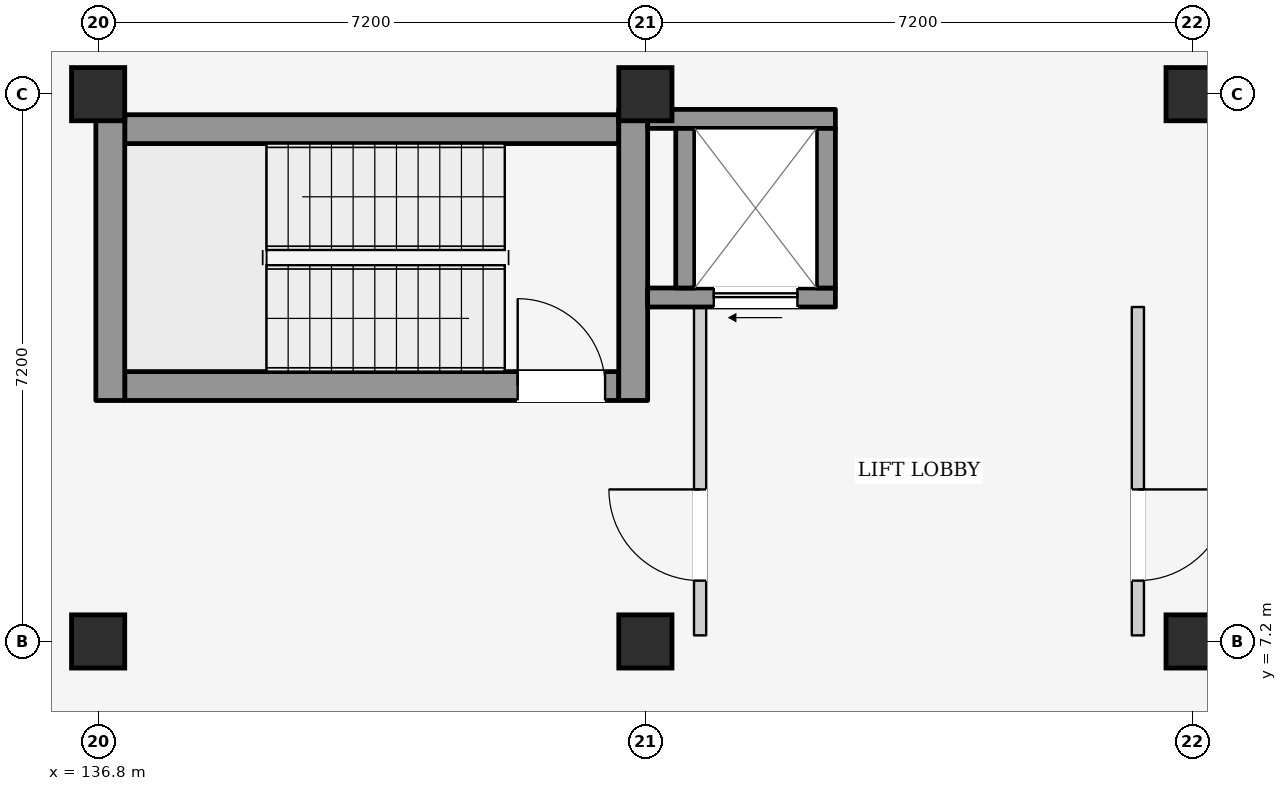
"""IFC4 building model, lengths in metres.
Left out: names, types, materials, properties, quantities, classifications, styles, units other than length and angle.
Written with IfcOpenShell. Run it as: python <this file> out.ifc"""

import sys

from ifc_helpers import new_model, si_unit, direction, frame, frame_2d, origin, origin_2d, place, context, subcontext, project, spatial, rectangle, extrude, element, fill, save


model = new_model("IFC4")
c1 = context("Model", 3, precision=1e-05, world=origin(), true_north=direction((0.0, 1.0)))
c2 = subcontext(c1, "Body", "Model", "MODEL_VIEW")
j1 = project(units=[si_unit("LENGTHUNIT", "METRE"), si_unit("PLANEANGLEUNIT", "RADIAN")], contexts=[c1])
p1 = place(None, origin())
s1 = spatial("IfcSite", under=j1, at=p1, CompositionType="ELEMENT")
p2 = place(p1, origin())
s2 = spatial("IfcBuilding", under=s1, at=p2, CompositionType="ELEMENT")
p3 = place(p2, frame((0.0, 0.0, -4.2)))
s3 = spatial("IfcBuildingStorey", under=s2, at=p3, CompositionType="ELEMENT", Elevation=-4.2)
for number, where, z_axis, x_axis in (
    (1, (136.8, 7.2, 0.0), (0.0, 0.0, 1.0), (1.0, 0.0, 0.0)),
    (2, (136.8, 14.4, 0.0), (0.0, 0.0, 1.0), (1.0, 0.0, 0.0)),
    (3, (144.0, 7.2, 0.0), (0.0, 0.0, 1.0), (1.0, 0.0, 0.0)),
    (4, (144.0, 14.4, 0.0), (0.0, 0.0, 1.0), (1.0, 0.0, 0.0)),
    (5, (151.2, 7.2, 0.0), (0.0, 0.0, 1.0), (1.0, 0.0, 0.0)),
    (6, (151.2, 14.4, 0.0), (0.0, 0.0, 1.0), (1.0, 0.0, 0.0)),
):
    element("IfcColumn", number, at=place(p3, frame(where, z_axis=z_axis, x_axis=x_axis)), inside=s3, PredefinedType="COLUMN", context=c2, shape_type="SweptSolid", body=[
        extrude(rectangle(XDim=0.7, YDim=0.7, at=origin_2d()), origin(), (0.0, 0.0, 1.0), 4.2),
    ])
p4 = place(p3, frame((137.15, 10.56, 0.0), z_axis=(0.0, 0.0, 1.0), x_axis=(1.0, 0.0, 0.0)))
e7 = element("IfcWall", 7, at=p4, inside=s3, PredefinedType="SHEAR", context=c2, shape_type="SweptSolid", body=[
    extrude(rectangle(XDim=6.5, YDim=0.38, at=frame_2d((3.25, 0.0))), origin(), (0.0, 0.0, 1.0), 3.79),
])
p5 = place(p4, frame((5.17, 0.0, 0.0)))
e8 = element("IfcOpeningElement", 8, at=p5, cuts=e7, PredefinedType="OPENING", context=c2, shape_type="SweptSolid", body=[
    extrude(rectangle(XDim=1.15, YDim=2.2, at=frame_2d((0.575, 1.1))), frame((0.0, 0.205, 0.0), z_axis=(0.0, -1.0, 0.0), x_axis=(1.0, 0.0, 0.0)), (0.0, 0.0, 1.0), 0.41),
])
p6 = place(p3, frame((137.15, 13.94, 0.0), z_axis=(0.0, 0.0, 1.0), x_axis=(1.0, 0.0, 0.0)))
e9 = element("IfcWall", 9, at=p6, inside=s3, PredefinedType="SHEAR", context=c2, shape_type="SweptSolid", body=[
    extrude(rectangle(XDim=6.5, YDim=0.38, at=frame_2d((3.25, 0.0))), origin(), (0.0, 0.0, 1.0), 3.79),
])
p7 = place(p3, frame((136.96, 10.37, 0.0), z_axis=(0.0, 0.0, 1.0), x_axis=(0.0, 1.0, 0.0)))
e10 = element("IfcWall", 10, at=p7, inside=s3, PredefinedType="SHEAR", context=c2, shape_type="SweptSolid", body=[
    extrude(rectangle(XDim=3.76, YDim=0.38, at=frame_2d((1.88, 0.0))), origin(), (0.0, 0.0, 1.0), 3.79),
])
p8 = place(p3, frame((143.84, 10.37, 0.0), z_axis=(0.0, 0.0, 1.0), x_axis=(0.0, 1.0, 0.0)))
e11 = element("IfcWall", 11, at=p8, inside=s3, PredefinedType="SHEAR", context=c2, shape_type="SweptSolid", body=[
    extrude(rectangle(XDim=3.83, YDim=0.38, at=frame_2d((1.915, 0.0))), origin(), (0.0, 0.0, 1.0), 3.79),
])
p9 = place(p3, frame((144.72, 7.28, 0.0), z_axis=(0.0, 0.0, 1.0), x_axis=(0.0, 1.0, 0.0)))
e12 = element("IfcWall", 12, at=p9, inside=s3, PredefinedType="PARTITIONING", context=c2, shape_type="SweptSolid", body=[
    extrude(rectangle(XDim=4.32, YDim=0.16, at=frame_2d((2.16, 0.0))), origin(), (0.0, 0.0, 1.0), 3.79),
])
p10 = place(p9, frame((0.72, 0.0, 0.0)))
e13 = element("IfcOpeningElement", 13, at=p10, cuts=e12, PredefinedType="OPENING", context=c2, shape_type="SweptSolid", body=[
    extrude(rectangle(XDim=1.2, YDim=2.2, at=frame_2d((0.6, 1.1))), frame((0.0, 0.095, 0.0), z_axis=(0.0, -1.0, 0.0), x_axis=(1.0, 0.0, 0.0)), (0.0, 0.0, 1.0), 0.19),
])
p11 = place(p3, frame((150.48, 7.28, 0.0), z_axis=(0.0, 0.0, 1.0), x_axis=(0.0, 1.0, 0.0)))
e14 = element("IfcWall", 14, at=p11, inside=s3, PredefinedType="PARTITIONING", context=c2, shape_type="SweptSolid", body=[
    extrude(rectangle(XDim=4.32, YDim=0.16, at=frame_2d((2.16, 0.0))), origin(), (0.0, 0.0, 1.0), 3.79),
])
p12 = place(p11, frame((0.72, 0.0, 0.0)))
e15 = element("IfcOpeningElement", 15, at=p12, cuts=e14, PredefinedType="OPENING", context=c2, shape_type="SweptSolid", body=[
    extrude(rectangle(XDim=1.2, YDim=2.2, at=frame_2d((0.6, 1.1))), frame((0.0, 0.095, 0.0), z_axis=(0.0, -1.0, 0.0), x_axis=(1.0, 0.0, 0.0)), (0.0, 0.0, 1.0), 0.19),
])
p13 = place(p3, frame((144.03, 11.725, 0.0), z_axis=(0.0, 0.0, 1.0), x_axis=(1.0, 0.0, 0.0)))
e16 = element("IfcWall", 16, at=p13, inside=s3, PredefinedType="SHEAR", context=c2, shape_type="SweptSolid", body=[
    extrude(rectangle(XDim=2.47, YDim=0.25, at=frame_2d((1.235, 0.0))), origin(), (0.0, 0.0, 1.0), 3.79),
])
p14 = place(p13, frame((0.87, 0.0, 0.0)))
e17 = element("IfcOpeningElement", 17, at=p14, cuts=e16, PredefinedType="OPENING", context=c2, shape_type="SweptSolid", body=[
    extrude(rectangle(XDim=1.1, YDim=2.15, at=frame_2d((0.55, 1.075))), frame((0.0, 0.14, 0.0), z_axis=(0.0, -1.0, 0.0), x_axis=(1.0, 0.0, 0.0)), (0.0, 0.0, 1.0), 0.28),
])
p15 = place(p3, frame((144.03, 14.075, 0.0), z_axis=(0.0, 0.0, 1.0), x_axis=(1.0, 0.0, 0.0)))
e18 = element("IfcWall", 18, at=p15, inside=s3, PredefinedType="SHEAR", context=c2, shape_type="SweptSolid", body=[
    extrude(rectangle(XDim=2.47, YDim=0.25, at=frame_2d((1.235, 0.0))), origin(), (0.0, 0.0, 1.0), 3.79),
])
for number, where, z_axis, x_axis in (
    (19, (144.525, 11.85, 0.0), (0.0, 0.0, 1.0), (0.0, 1.0, 0.0)),
    (20, (146.375, 11.85, 0.0), (0.0, 0.0, 1.0), (0.0, 1.0, 0.0)),
):
    element("IfcWall", number, at=place(p3, frame(where, z_axis=z_axis, x_axis=x_axis)), inside=s3, PredefinedType="SHEAR", context=c2, shape_type="SweptSolid", body=[
        extrude(rectangle(XDim=2.1, YDim=0.25, at=frame_2d((1.05, 0.0))), origin(), (0.0, 0.0, 1.0), 3.79),
    ])
p16 = place(p5, origin())
e21 = element("IfcDoor", 21, at=p16, inside=s3, OperationType="SINGLE_SWING_LEFT", PredefinedType="DOOR", context=c2, shape_type="SweptSolid", body=[
    extrude(rectangle(XDim=1.15, YDim=2.2, at=frame_2d((0.575, 1.1))), frame((0.0, 0.025, 0.0), z_axis=(0.0, -1.0, 0.0), x_axis=(1.0, 0.0, 0.0)), (0.0, 0.0, 1.0), 0.05),
])
fill(e8, e21)
p17 = place(p10, origin())
e22 = element("IfcDoor", 22, at=p17, inside=s3, OperationType="SINGLE_SWING_RIGHT", PredefinedType="DOOR", context=c2, shape_type="SweptSolid", body=[
    extrude(rectangle(XDim=1.2, YDim=2.2, at=frame_2d((0.6, 1.1))), frame((0.0, 0.025, 0.0), z_axis=(0.0, -1.0, 0.0), x_axis=(1.0, 0.0, 0.0)), (0.0, 0.0, 1.0), 0.05),
])
fill(e13, e22)
p18 = place(p12, frame((1.2, 0.0, 0.0), z_axis=(0.0, 0.0, 1.0), x_axis=(-1.0, 0.0, 0.0)))
e23 = element("IfcDoor", 23, at=p18, inside=s3, OperationType="SINGLE_SWING_LEFT", PredefinedType="DOOR", context=c2, shape_type="SweptSolid", body=[
    extrude(rectangle(XDim=1.2, YDim=2.2, at=frame_2d((0.6, 1.1))), frame((0.0, 0.025, 0.0), z_axis=(0.0, -1.0, 0.0), x_axis=(1.0, 0.0, 0.0)), (0.0, 0.0, 1.0), 0.05),
])
fill(e15, e23)
p19 = place(p14, frame((1.1, 0.0, 0.0), z_axis=(0.0, 0.0, 1.0), x_axis=(-1.0, 0.0, 0.0)))
e24 = element("IfcDoor", 24, at=p19, inside=s3, OperationType="SLIDING_TO_LEFT", PredefinedType="DOOR", context=c2, shape_type="SweptSolid", body=[
    extrude(rectangle(XDim=1.1, YDim=2.15, at=frame_2d((0.55, 1.075))), frame((0.0, 0.025, 0.0), z_axis=(0.0, -1.0, 0.0), x_axis=(1.0, 0.0, 0.0)), (0.0, 0.0, 1.0), 0.05),
])
fill(e17, e24)
save(model, sys.argv[1])
